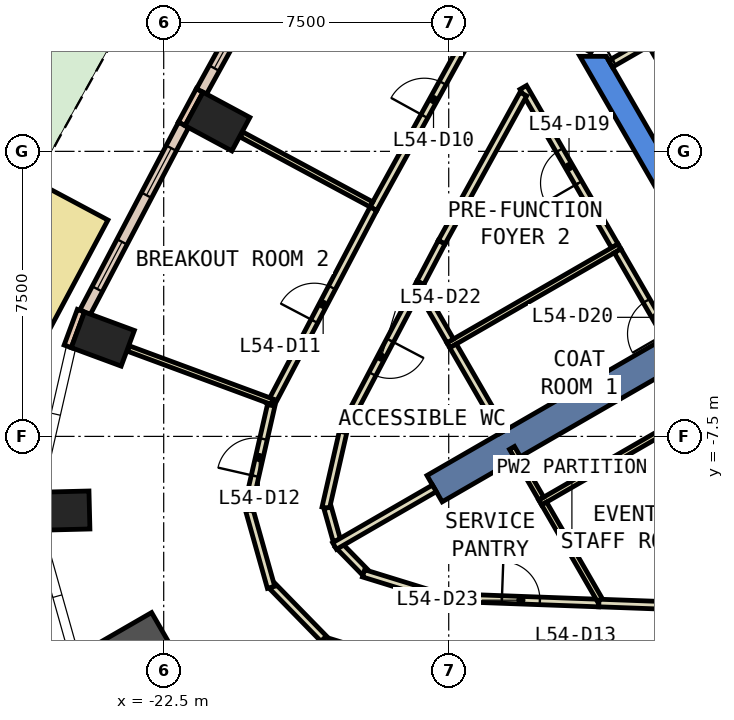
"""IFC4 building model, lengths in metres.
Left out: names, types, materials, properties, quantities, classifications, styles, units other than length and angle.
Written with IfcOpenShell. Run it as: python <this file> out.ifc"""

import sys

from ifc_helpers import new_model, si_unit, direction, frame, frame_2d, origin, origin_2d, place, context, subcontext, project, spatial, polyline, rectangle, outline, extrude, element, fill, save


model = new_model("IFC4")
c1 = context("Model", 3, precision=1e-05, world=origin(), true_north=direction((0.0, 1.0)))
c2 = subcontext(c1, "Body", "Model", "MODEL_VIEW")
j1 = project(units=[si_unit("LENGTHUNIT", "METRE"), si_unit("PLANEANGLEUNIT", "RADIAN")], contexts=[c1])
p1 = place(None, origin())
s1 = spatial("IfcSite", under=j1, at=p1, CompositionType="ELEMENT")
p2 = place(p1, origin())
s2 = spatial("IfcBuilding", under=s1, at=p2, CompositionType="ELEMENT")
p3 = place(p2, frame((0.0, 0.0, 241.4)))
s3 = spatial("IfcBuildingStorey", under=s2, at=p3, CompositionType="ELEMENT", Elevation=241.4)
for number, where, z_axis, x_axis in (
    (1, (-21.086, 0.784, 0.0), (0.0, 0.0, 1.0), (0.474, 0.881, 0.0)),
    (2, (-24.102, -4.939, 0.0), (0.0, 0.0, 1.0), (0.347, 0.938, 0.0)),
    (3, (-25.154, -9.454, 0.0), (0.0, 0.0, 1.0), (-0.025, 1.0, 0.0)),
):
    element("IfcColumn", number, at=place(p3, frame(where, z_axis=z_axis, x_axis=x_axis)), inside=s3, PredefinedType="COLUMN", context=c2, shape_type="SweptSolid", body=[
        extrude(rectangle(XDim=1.0, YDim=1.4, at=origin_2d()), origin(), (0.0, 0.0, 1.0), 3.26),
    ])
p4 = place(p3, frame((-23.148, -13.365, 0.0), z_axis=(0.0, 0.0, 1.0), x_axis=(0.866025403784, 0.5, 0.0)))
e4 = element("IfcColumn", 4, at=p4, inside=s3, PredefinedType="COLUMN", context=c2, shape_type="SweptSolid", body=[
    extrude(rectangle(XDim=1.8, YDim=1.8, at=origin_2d()), origin(), (0.0, 0.0, 1.0), 3.26),
])
p5 = place(p3, frame((0.0, 0.0, -0.6)))
e5 = element("IfcWall", 5, at=p5, inside=s3, PredefinedType="SHEAR", context=c2, shape_type="SweptSolid", body=[
    extrude(outline(polyline([(-11.547, 2.5), (-5.774, -7.5), (-5.427, -6.9), (-10.854, 2.5), (-11.547, 2.5)])), origin(), (0.0, 0.0, 1.0), 3.86),
])
p6 = place(p3, frame((-7.578, -4.375, -0.6), z_axis=(0.0, 0.0, 1.0), x_axis=(-0.866024315419, -0.5000018851, 0.0)))
e6 = element("IfcWall", 6, at=p6, inside=s3, PredefinedType="SHEAR", context=c2, shape_type="SweptSolid", body=[
    extrude(rectangle(XDim=9.0, YDim=0.8, at=frame_2d((4.5, 0.0))), origin(), (0.0, 0.0, 1.0), 3.86),
])
p7 = place(p3, frame((-21.553, 1.604, 0.0), z_axis=(0.0, 0.0, 1.0), x_axis=(-0.473852444207, -0.880604259085, 0.0)))
e7 = element("IfcWall", 7, at=p7, inside=s3, PredefinedType="STANDARD", context=c2, shape_type="SweptSolid", body=[
    extrude(rectangle(XDim=1.0, YDim=0.2, at=frame_2d((0.5, 0.0))), origin(), (0.0, 0.0, 1.0), 3.26),
])
p8 = place(p3, frame((-24.679, -4.193, 0.0), z_axis=(0.0, 0.0, 1.0), x_axis=(-0.346892928577, -0.937904737222, 0.0)))
e8 = element("IfcWall", 8, at=p8, inside=s3, PredefinedType="STANDARD", context=c2, shape_type="SweptSolid", body=[
    extrude(rectangle(XDim=1.0, YDim=0.2, at=frame_2d((0.5, 0.0))), origin(), (0.0, 0.0, 1.0), 3.26),
])
p9 = place(p3, frame((-18.805, 6.475, 0.0), z_axis=(0.0, 0.0, 1.0), x_axis=(-0.482734585173, -0.875766704253, 0.0)))
e9 = element("IfcWall", 9, at=p9, inside=s3, PredefinedType="STANDARD", context=c2, shape_type="SweptSolid", body=[
    extrude(rectangle(XDim=5.593, YDim=0.3, at=frame_2d((2.796, 0.0))), origin(), (0.0, 0.0, 1.0), 3.26),
])
p10 = place(p9, frame((0.398, 0.0, 0.0)))
e10 = element("IfcOpeningElement", 10, at=p10, cuts=e9, PredefinedType="OPENING", context=c2, shape_type="SweptSolid", body=[
    extrude(rectangle(XDim=2.0, YDim=2.4, at=frame_2d((1.0, 1.2))), frame((0.0, 0.16, 0.0), z_axis=(0.0, -1.0, 0.0), x_axis=(1.0, 0.0, 0.0)), (0.0, 0.0, 1.0), 0.32),
])
p11 = place(p9, frame((3.495, 0.0, 0.9)))
e11 = element("IfcOpeningElement", 11, at=p11, cuts=e9, PredefinedType="OPENING", context=c2, shape_type="SweptSolid", body=[
    extrude(rectangle(XDim=1.4, YDim=2.0, at=frame_2d((0.7, 1.0))), frame((0.0, 0.16, 0.0), z_axis=(0.0, -1.0, 0.0), x_axis=(1.0, 0.0, 0.0)), (0.0, 0.0, 1.0), 0.32),
])
p12 = place(p3, frame((-21.978, 0.698, 0.0), z_axis=(0.0, 0.0, 1.0), x_axis=(-0.465228032148, -0.885190871001, 0.0)))
e12 = element("IfcWall", 12, at=p12, inside=s3, PredefinedType="STANDARD", context=c2, shape_type="SweptSolid", body=[
    extrude(rectangle(XDim=5.572, YDim=0.3, at=frame_2d((2.786, 0.0))), origin(), (0.0, 0.0, 1.0), 3.26),
])
p13 = place(p12, frame((0.693, 0.0, 0.9)))
e13 = element("IfcOpeningElement", 13, at=p13, cuts=e12, PredefinedType="OPENING", context=c2, shape_type="SweptSolid", body=[
    extrude(rectangle(XDim=1.4, YDim=2.0, at=frame_2d((0.7, 1.0))), frame((0.0, 0.16, 0.0), z_axis=(0.0, -1.0, 0.0), x_axis=(1.0, 0.0, 0.0)), (0.0, 0.0, 1.0), 0.32),
])
p14 = place(p12, frame((3.479, 0.0, 0.9)))
e14 = element("IfcOpeningElement", 14, at=p14, cuts=e12, PredefinedType="OPENING", context=c2, shape_type="SweptSolid", body=[
    extrude(rectangle(XDim=1.4, YDim=2.0, at=frame_2d((0.7, 1.0))), frame((0.0, 0.16, 0.0), z_axis=(0.0, -1.0, 0.0), x_axis=(1.0, 0.0, 0.0)), (0.0, 0.0, 1.0), 0.32),
])
p15 = place(p3, frame((-24.806, -1.36, 0.0), z_axis=(0.0, 0.0, 1.0), x_axis=(-0.470628729942, -0.882331342837, 0.0)))
e15 = element("IfcWall", 15, at=p15, inside=s3, PredefinedType="STANDARD", context=c2, shape_type="SweptSolid", body=[
    extrude(rectangle(XDim=5.946, YDim=1.9, at=frame_2d((2.973, 0.0))), origin(), (0.0, 0.0, 1.0), 0.8),
])
p16 = place(p3, frame((-10.63, -2.488, 0.0), z_axis=(0.0, 0.0, 1.0), x_axis=(-0.500108649621, 0.865962665808, 0.0)))
e16 = element("IfcWall", 16, at=p16, inside=s3, PredefinedType="PARTITIONING", context=c2, shape_type="SweptSolid", body=[
    extrude(rectangle(XDim=4.815, YDim=0.2, at=frame_2d((2.408, 0.0))), origin(), (0.0, 0.0, 1.0), 3.26),
])
p17 = place(p16, frame((1.908, 0.0, 0.0)))
e17 = element("IfcOpeningElement", 17, at=p17, cuts=e16, PredefinedType="OPENING", context=c2, shape_type="SweptSolid", body=[
    extrude(rectangle(XDim=1.0, YDim=2.1, at=frame_2d((0.5, 1.05))), frame((0.0, 0.11, 0.0), z_axis=(0.0, -1.0, 0.0), x_axis=(1.0, 0.0, 0.0)), (0.0, 0.0, 1.0), 0.22),
])
p18 = place(p3, frame((-13.036, 1.508, 0.0), z_axis=(0.0, 0.0, 1.0), x_axis=(-0.482884552822, -0.87568402329, 0.0)))
e18 = element("IfcWall", 18, at=p18, inside=s3, PredefinedType="PARTITIONING", context=c2, shape_type="SweptSolid", body=[
    extrude(rectangle(XDim=4.453, YDim=0.2, at=frame_2d((2.226, 0.0))), origin(), (0.0, 0.0, 1.0), 3.26),
])
p19 = place(p3, frame((-15.186, -2.391, 0.0), z_axis=(0.0, 0.0, 1.0), x_axis=(-0.464794189951, -0.885418748948, 0.0)))
e19 = element("IfcWall", 19, at=p19, inside=s3, PredefinedType="PARTITIONING", context=c2, shape_type="SweptSolid", body=[
    extrude(rectangle(XDim=1.205, YDim=0.2, at=frame_2d((0.603, 0.0))), origin(), (0.0, 0.0, 1.0), 3.26),
])
p20 = place(p3, frame((-11.052, -11.884, 0.0), z_axis=(0.0, 0.0, 1.0), x_axis=(0.999335249241, -0.036456270033, 0.0)))
e20 = element("IfcWall", 20, at=p20, inside=s3, PredefinedType="PARTITIONING", context=c2, shape_type="SweptSolid", body=[
    extrude(rectangle(XDim=3.154, YDim=0.2, at=frame_2d((1.577, 0.0))), origin(), (0.0, 0.0, 1.0), 3.26),
])
p21 = place(p3, frame((-15.746, -3.458, 0.0), z_axis=(0.0, 0.0, 1.0), x_axis=(-0.465179971699, -0.885216128372, 0.0)))
e21 = element("IfcWall", 21, at=p21, inside=s3, PredefinedType="PARTITIONING", context=c2, shape_type="SweptSolid", body=[
    extrude(rectangle(XDim=4.424, YDim=0.2, at=frame_2d((2.212, 0.0))), origin(), (0.0, 0.0, 1.0), 3.26),
])
p22 = place(p21, frame((1.712, 0.0, 0.0)))
e22 = element("IfcOpeningElement", 22, at=p22, cuts=e21, PredefinedType="OPENING", context=c2, shape_type="SweptSolid", body=[
    extrude(rectangle(XDim=1.0, YDim=2.1, at=frame_2d((0.5, 1.05))), frame((0.0, 0.11, 0.0), z_axis=(0.0, -1.0, 0.0), x_axis=(1.0, 0.0, 0.0)), (0.0, 0.0, 1.0), 0.22),
])
p23 = place(p3, frame((-17.78, -7.383, 0.0), z_axis=(0.0, 0.0, 1.0), x_axis=(-0.222760041204, -0.974873306662, 0.0)))
e23 = element("IfcWall", 23, at=p23, inside=s3, PredefinedType="PARTITIONING", context=c2, shape_type="SweptSolid", body=[
    extrude(rectangle(XDim=2.047, YDim=0.2, at=frame_2d((1.024, 0.0))), origin(), (0.0, 0.0, 1.0), 3.26),
])
p24 = place(p3, frame((-18.187, -9.378, 0.0), z_axis=(0.0, 0.0, 1.0), x_axis=(0.270785141481, -0.962639811743, 0.0)))
e24 = element("IfcWall", 24, at=p24, inside=s3, PredefinedType="PARTITIONING", context=c2, shape_type="SweptSolid", body=[
    extrude(rectangle(XDim=0.894, YDim=0.2, at=frame_2d((0.447, 0.0))), origin(), (0.0, 0.0, 1.0), 3.26),
])
p25 = place(p3, frame((-17.915, -10.344, 0.0), z_axis=(0.0, 0.0, 1.0), x_axis=(0.698527813511, -0.715582904877, 0.0)))
e25 = element("IfcWall", 25, at=p25, inside=s3, PredefinedType="PARTITIONING", context=c2, shape_type="SweptSolid", body=[
    extrude(rectangle(XDim=1.002, YDim=0.2, at=frame_2d((0.501, 0.0))), origin(), (0.0, 0.0, 1.0), 3.26),
])
p26 = place(p3, frame((-17.241, -11.103, 0.0), z_axis=(0.0, 0.0, 1.0), x_axis=(0.95563113363, -0.294566013716, 0.0)))
e26 = element("IfcWall", 26, at=p26, inside=s3, PredefinedType="PARTITIONING", context=c2, shape_type="SweptSolid", body=[
    extrude(rectangle(XDim=2.036, YDim=0.2, at=frame_2d((1.018, 0.0))), origin(), (0.0, 0.0, 1.0), 3.26),
])
p27 = place(p3, frame((-15.3, -11.729, 0.0), z_axis=(0.0, 0.0, 1.0), x_axis=(0.999326350165, -0.036699398722, 0.0)))
e27 = element("IfcWall", 27, at=p27, inside=s3, PredefinedType="PARTITIONING", context=c2, shape_type="SweptSolid", body=[
    extrude(rectangle(XDim=4.251, YDim=0.2, at=frame_2d((2.125, 0.0))), origin(), (0.0, 0.0, 1.0), 3.26),
])
p28 = place(p27, frame((1.7, 0.0, 0.0)))
e28 = element("IfcOpeningElement", 28, at=p28, cuts=e27, PredefinedType="OPENING", context=c2, shape_type="SweptSolid", body=[
    extrude(rectangle(XDim=1.0, YDim=2.1, at=frame_2d((0.5, 1.05))), frame((0.0, 0.11, 0.0), z_axis=(0.0, -1.0, 0.0), x_axis=(1.0, 0.0, 0.0)), (0.0, 0.0, 1.0), 0.22),
])
p29 = place(p3, frame((-16.983, -1.509, 0.0), z_axis=(0.0, 0.0, 1.0), x_axis=(0.482785999899, 0.875738361785, 0.0)))
e29 = element("IfcWall", 29, at=p29, inside=s3, PredefinedType="PARTITIONING", context=c2, shape_type="SweptSolid", body=[
    extrude(rectangle(XDim=6.558, YDim=0.2, at=frame_2d((3.279, 0.0))), origin(), (0.0, 0.0, 1.0), 3.26),
])
p30 = place(p29, frame((2.779, 0.0, 0.0)))
e30 = element("IfcOpeningElement", 30, at=p30, cuts=e29, PredefinedType="OPENING", context=c2, shape_type="SweptSolid", body=[
    extrude(rectangle(XDim=1.0, YDim=2.1, at=frame_2d((0.5, 1.05))), frame((0.0, 0.11, 0.0), z_axis=(0.0, -1.0, 0.0), x_axis=(1.0, 0.0, 0.0)), (0.0, 0.0, 1.0), 0.22),
])
p31 = place(p3, frame((-19.696, -6.675, 0.0), z_axis=(0.0, 0.0, 1.0), x_axis=(0.465165163774, 0.88522390976, 0.0)))
e31 = element("IfcWall", 31, at=p31, inside=s3, PredefinedType="PARTITIONING", context=c2, shape_type="SweptSolid", body=[
    extrude(rectangle(XDim=5.835, YDim=0.2, at=frame_2d((2.917, 0.0))), origin(), (0.0, 0.0, 1.0), 3.26),
])
p32 = place(p31, frame((2.492, 0.0, 0.0)))
e32 = element("IfcOpeningElement", 32, at=p32, cuts=e31, PredefinedType="OPENING", context=c2, shape_type="SweptSolid", body=[
    extrude(rectangle(XDim=1.0, YDim=2.1, at=frame_2d((0.5, 1.05))), frame((0.0, 0.11, 0.0), z_axis=(0.0, -1.0, 0.0), x_axis=(1.0, 0.0, 0.0)), (0.0, 0.0, 1.0), 0.22),
])
p33 = place(p3, frame((-15.632, -13.692, 0.0), z_axis=(0.0, 0.0, 1.0), x_axis=(-0.955600342663, 0.294665887239, 0.0)))
e33 = element("IfcWall", 33, at=p33, inside=s3, PredefinedType="PARTITIONING", context=c2, shape_type="SweptSolid", body=[
    extrude(rectangle(XDim=2.81, YDim=0.2, at=frame_2d((1.405, 0.0))), origin(), (0.0, 0.0, 1.0), 3.26),
])
p34 = place(p3, frame((-18.291, -12.822, 0.0), z_axis=(0.0, 0.0, 1.0), x_axis=(-0.698477855606, 0.715631668687, 0.0)))
e34 = element("IfcWall", 34, at=p34, inside=s3, PredefinedType="PARTITIONING", context=c2, shape_type="SweptSolid", body=[
    extrude(rectangle(XDim=1.921, YDim=0.2, at=frame_2d((0.961, 0.0))), origin(), (0.0, 0.0, 1.0), 3.26),
])
p35 = place(p3, frame((-19.675, -11.472, 0.0), z_axis=(0.0, 0.0, 1.0), x_axis=(-0.270905475888, 0.962605954238, 0.0)))
e35 = element("IfcWall", 35, at=p35, inside=s3, PredefinedType="PARTITIONING", context=c2, shape_type="SweptSolid", body=[
    extrude(rectangle(XDim=2.122, YDim=0.2, at=frame_2d((1.061, 0.0))), origin(), (0.0, 0.0, 1.0), 3.26),
])
p36 = place(p3, frame((-20.299, -9.43, 0.0), z_axis=(0.0, 0.0, 1.0), x_axis=(0.222523624687, 0.974927298036, 0.0)))
e36 = element("IfcWall", 36, at=p36, inside=s3, PredefinedType="PARTITIONING", context=c2, shape_type="SweptSolid", body=[
    extrude(rectangle(XDim=2.817, YDim=0.2, at=frame_2d((1.409, 0.0))), origin(), (0.0, 0.0, 1.0), 3.26),
])
p37 = place(p36, frame((0.909, 0.0, 0.0)))
e37 = element("IfcOpeningElement", 37, at=p37, cuts=e36, PredefinedType="OPENING", context=c2, shape_type="SweptSolid", body=[
    extrude(rectangle(XDim=1.0, YDim=2.1, at=frame_2d((0.5, 1.05))), frame((0.0, 0.11, 0.0), z_axis=(0.0, -1.0, 0.0), x_axis=(1.0, 0.0, 0.0)), (0.0, 0.0, 1.0), 0.22),
])
p38 = place(p3, frame((-10.741, 2.303, 0.0), z_axis=(0.0, 0.0, 1.0), x_axis=(0.866063652425, 0.499933745558, 0.0)))
e38 = element("IfcWall", 38, at=p38, inside=s3, PredefinedType="PARTITIONING", context=c2, shape_type="SweptSolid", body=[
    extrude(rectangle(XDim=1.1, YDim=0.2, at=frame_2d((0.55, 0.0))), origin(), (0.0, 0.0, 1.0), 3.26),
])
p39 = place(p38, frame((0.1, 0.0, 0.0)))
e39 = element("IfcOpeningElement", 39, at=p39, cuts=e38, PredefinedType="OPENING", context=c2, shape_type="SweptSolid", body=[
    extrude(rectangle(XDim=0.9, YDim=2.1, at=frame_2d((0.45, 1.05))), frame((0.0, 0.11, 0.0), z_axis=(0.0, -1.0, 0.0), x_axis=(1.0, 0.0, 0.0)), (0.0, 0.0, 1.0), 0.22),
])
p40 = place(p3, frame((-9.751, 2.99, 0.0), z_axis=(0.0, 0.0, 1.0), x_axis=(0.500012163284, -0.866018381195, 0.0)))
e40 = element("IfcWall", 40, at=p40, inside=s3, PredefinedType="PARTITIONING", context=c2, shape_type="SweptSolid", body=[
    extrude(rectangle(XDim=8.0, YDim=0.2, at=frame_2d((4.0, 0.0))), origin(), (0.0, 0.0, 1.0), 3.26),
])
p41 = place(p3, frame((-10.506, -2.503, 0.0), z_axis=(0.0, 0.0, 1.0), x_axis=(-0.866044872465, -0.49996627774, 0.0)))
e41 = element("IfcWall", 41, at=p41, inside=s3, PredefinedType="PARTITIONING", context=c2, shape_type="SweptSolid", body=[
    extrude(rectangle(XDim=5.2, YDim=0.15, at=frame_2d((2.6, 0.0))), origin(), (0.0, 0.0, 1.0), 3.26),
])
p42 = place(p3, frame((-14.96, -4.988, 0.0), z_axis=(0.0, 0.0, 1.0), x_axis=(-0.500175017317, 0.865924333907, 0.0)))
e42 = element("IfcWall", 42, at=p42, inside=s3, PredefinedType="PARTITIONING", context=c2, shape_type="SweptSolid", body=[
    extrude(rectangle(XDim=1.666, YDim=0.2, at=frame_2d((0.833, 0.0))), origin(), (0.0, 0.0, 1.0), 3.26),
])
p43 = place(p3, frame((-8.111, -6.651, 0.0), z_axis=(0.0, 0.0, 1.0), x_axis=(-0.865984471925, -0.50007088936, 0.0)))
e43 = element("IfcWall", 43, at=p43, inside=s3, PredefinedType="PARTITIONING", context=c2, shape_type="SweptSolid", body=[
    extrude(rectangle(XDim=5.176, YDim=0.15, at=frame_2d((2.588, 0.0))), origin(), (0.0, 0.0, 1.0), 3.26),
])
p44 = place(p3, frame((-13.58, -7.379, 0.0), z_axis=(0.0, 0.0, 1.0), x_axis=(-0.499870876044, 0.866099940701, 0.0)))
e44 = element("IfcWall", 44, at=p44, inside=s3, PredefinedType="PARTITIONING", context=c2, shape_type="SweptSolid", body=[
    extrude(rectangle(XDim=2.611, YDim=0.2, at=frame_2d((1.305, 0.0))), origin(), (0.0, 0.0, 1.0), 3.26),
])
p45 = place(p3, frame((-12.565, -9.136, 0.0), z_axis=(0.0, 0.0, 1.0), x_axis=(-0.500198329269, 0.865910868044, 0.0)))
e45 = element("IfcWall", 45, at=p45, inside=s3, PredefinedType="PARTITIONING", context=c2, shape_type="SweptSolid", body=[
    extrude(rectangle(XDim=1.539, YDim=0.15, at=frame_2d((0.77, 0.0))), origin(), (0.0, 0.0, 1.0), 3.26),
])
p46 = place(p3, frame((-11.027, -11.8, 0.0), z_axis=(0.0, 0.0, 1.0), x_axis=(-0.499980071345, 0.866036909293, 0.0)))
e46 = element("IfcWall", 46, at=p46, inside=s3, PredefinedType="PARTITIONING", context=c2, shape_type="SweptSolid", body=[
    extrude(rectangle(XDim=2.926, YDim=0.15, at=frame_2d((1.463, 0.0))), origin(), (0.0, 0.0, 1.0), 3.26),
])
p47 = place(p3, frame((-15.377, -8.867, 0.0), z_axis=(0.0, 0.0, 1.0), x_axis=(-0.865965767548, -0.500103278768, 0.0)))
e47 = element("IfcWall", 47, at=p47, inside=s3, PredefinedType="PARTITIONING", context=c2, shape_type="SweptSolid", body=[
    extrude(rectangle(XDim=3.033, YDim=0.2, at=frame_2d((1.517, 0.0))), origin(), (0.0, 0.0, 1.0), 3.26),
])
p48 = place(p3, frame((-17.035, -1.396, 0.0), z_axis=(0.0, 0.0, 1.0), x_axis=(-0.88055795398, 0.473938487234, 0.0)))
e48 = element("IfcWall", 48, at=p48, inside=s3, PredefinedType="PARTITIONING", context=c2, shape_type="SweptSolid", body=[
    extrude(rectangle(XDim=3.88, YDim=0.15, at=frame_2d((1.94, 0.0))), origin(), (0.0, 0.0, 1.0), 3.26),
])
p49 = place(p3, frame((-19.649, -6.586, 0.0), z_axis=(0.0, 0.0, 1.0), x_axis=(-0.937935790958, 0.346808956114, 0.0)))
e49 = element("IfcWall", 49, at=p49, inside=s3, PredefinedType="PARTITIONING", context=c2, shape_type="SweptSolid", body=[
    extrude(rectangle(XDim=4.028, YDim=0.15, at=frame_2d((2.014, 0.0))), origin(), (0.0, 0.0, 1.0), 3.26),
])
p50 = place(p3, frame((-9.25, -4.878, 0.0), z_axis=(0.0, 0.0, 1.0), x_axis=(-0.500032875382, 0.866006422342, 0.0)))
e50 = element("IfcWall", 50, at=p50, inside=s3, PredefinedType="PARTITIONING", context=c2, shape_type="SweptSolid", body=[
    extrude(rectangle(XDim=2.61, YDim=0.2, at=frame_2d((1.305, 0.0))), origin(), (0.0, 0.0, 1.0), 3.26),
])
p51 = place(p50, frame((0.09, 0.0, 0.0)))
e51 = element("IfcOpeningElement", 51, at=p51, cuts=e50, PredefinedType="OPENING", context=c2, shape_type="SweptSolid", body=[
    extrude(rectangle(XDim=1.0, YDim=2.1, at=frame_2d((0.5, 1.05))), frame((0.0, 0.11, 0.0), z_axis=(0.0, -1.0, 0.0), x_axis=(1.0, 0.0, 0.0)), (0.0, 0.0, 1.0), 0.22),
])
p52 = place(p11, origin())
e52 = element("IfcWindow", 52, at=p52, inside=s3, PartitioningType="SINGLE_PANEL", PredefinedType="WINDOW", context=c2, shape_type="SweptSolid", body=[
    extrude(rectangle(XDim=1.4, YDim=2.0, at=frame_2d((0.7, 1.0))), frame((0.0, 0.03, 0.0), z_axis=(0.0, -1.0, 0.0), x_axis=(1.0, 0.0, 0.0)), (0.0, 0.0, 1.0), 0.06),
])
fill(e11, e52)
p53 = place(p13, origin())
e53 = element("IfcWindow", 53, at=p53, inside=s3, PartitioningType="SINGLE_PANEL", PredefinedType="WINDOW", context=c2, shape_type="SweptSolid", body=[
    extrude(rectangle(XDim=1.4, YDim=2.0, at=frame_2d((0.7, 1.0))), frame((0.0, 0.03, 0.0), z_axis=(0.0, -1.0, 0.0), x_axis=(1.0, 0.0, 0.0)), (0.0, 0.0, 1.0), 0.06),
])
fill(e13, e53)
p54 = place(p14, origin())
e54 = element("IfcWindow", 54, at=p54, inside=s3, PartitioningType="SINGLE_PANEL", PredefinedType="WINDOW", context=c2, shape_type="SweptSolid", body=[
    extrude(rectangle(XDim=1.4, YDim=2.0, at=frame_2d((0.7, 1.0))), frame((0.0, 0.03, 0.0), z_axis=(0.0, -1.0, 0.0), x_axis=(1.0, 0.0, 0.0)), (0.0, 0.0, 1.0), 0.06),
])
fill(e14, e54)
p55 = place(p30, origin())
e55 = element("IfcDoor", 55, at=p55, inside=s3, OperationType="SINGLE_SWING_LEFT", PredefinedType="DOOR", context=c2, shape_type="SweptSolid", body=[
    extrude(rectangle(XDim=1.0, YDim=2.1, at=frame_2d((0.5, 1.05))), frame((0.0, 0.025, 0.0), z_axis=(0.0, -1.0, 0.0), x_axis=(1.0, 0.0, 0.0)), (0.0, 0.0, 1.0), 0.05),
])
fill(e30, e55)
p56 = place(p32, origin())
e56 = element("IfcDoor", 56, at=p56, inside=s3, OperationType="SINGLE_SWING_LEFT", PredefinedType="DOOR", context=c2, shape_type="SweptSolid", body=[
    extrude(rectangle(XDim=1.0, YDim=2.1, at=frame_2d((0.5, 1.05))), frame((0.0, 0.025, 0.0), z_axis=(0.0, -1.0, 0.0), x_axis=(1.0, 0.0, 0.0)), (0.0, 0.0, 1.0), 0.05),
])
fill(e32, e56)
p57 = place(p37, origin())
e57 = element("IfcDoor", 57, at=p57, inside=s3, OperationType="SINGLE_SWING_LEFT", PredefinedType="DOOR", context=c2, shape_type="SweptSolid", body=[
    extrude(rectangle(XDim=1.0, YDim=2.1, at=frame_2d((0.5, 1.05))), frame((0.0, 0.025, 0.0), z_axis=(0.0, -1.0, 0.0), x_axis=(1.0, 0.0, 0.0)), (0.0, 0.0, 1.0), 0.05),
])
fill(e37, e57)
p58 = place(p17, origin())
e58 = element("IfcDoor", 58, at=p58, inside=s3, OperationType="SINGLE_SWING_LEFT", PredefinedType="DOOR", context=c2, shape_type="SweptSolid", body=[
    extrude(rectangle(XDim=1.0, YDim=2.1, at=frame_2d((0.5, 1.05))), frame((0.0, 0.025, 0.0), z_axis=(0.0, -1.0, 0.0), x_axis=(1.0, 0.0, 0.0)), (0.0, 0.0, 1.0), 0.05),
])
fill(e17, e58)
p59 = place(p51, origin())
e59 = element("IfcDoor", 59, at=p59, inside=s3, OperationType="SINGLE_SWING_LEFT", PredefinedType="DOOR", context=c2, shape_type="SweptSolid", body=[
    extrude(rectangle(XDim=1.0, YDim=2.1, at=frame_2d((0.5, 1.05))), frame((0.0, 0.025, 0.0), z_axis=(0.0, -1.0, 0.0), x_axis=(1.0, 0.0, 0.0)), (0.0, 0.0, 1.0), 0.05),
])
fill(e51, e59)
p60 = place(p22, origin())
e60 = element("IfcDoor", 60, at=p60, inside=s3, OperationType="SINGLE_SWING_LEFT", PredefinedType="DOOR", context=c2, shape_type="SweptSolid", body=[
    extrude(rectangle(XDim=1.0, YDim=2.1, at=frame_2d((0.5, 1.05))), frame((0.0, 0.025, 0.0), z_axis=(0.0, -1.0, 0.0), x_axis=(1.0, 0.0, 0.0)), (0.0, 0.0, 1.0), 0.05),
])
fill(e22, e60)
p61 = place(p28, origin())
e61 = element("IfcDoor", 61, at=p61, inside=s3, OperationType="SINGLE_SWING_LEFT", PredefinedType="DOOR", context=c2, shape_type="SweptSolid", body=[
    extrude(rectangle(XDim=1.0, YDim=2.1, at=frame_2d((0.5, 1.05))), frame((0.0, 0.025, 0.0), z_axis=(0.0, -1.0, 0.0), x_axis=(1.0, 0.0, 0.0)), (0.0, 0.0, 1.0), 0.05),
])
fill(e28, e61)
p62 = place(p39, origin())
e62 = element("IfcDoor", 62, at=p62, inside=s3, OperationType="SINGLE_SWING_RIGHT", PredefinedType="DOOR", context=c2, shape_type="SweptSolid", body=[
    extrude(rectangle(XDim=0.9, YDim=2.1, at=frame_2d((0.45, 1.05))), frame((0.0, 0.025, 0.0), z_axis=(0.0, -1.0, 0.0), x_axis=(1.0, 0.0, 0.0)), (0.0, 0.0, 1.0), 0.05),
])
fill(e39, e62)
save(model, sys.argv[1])
